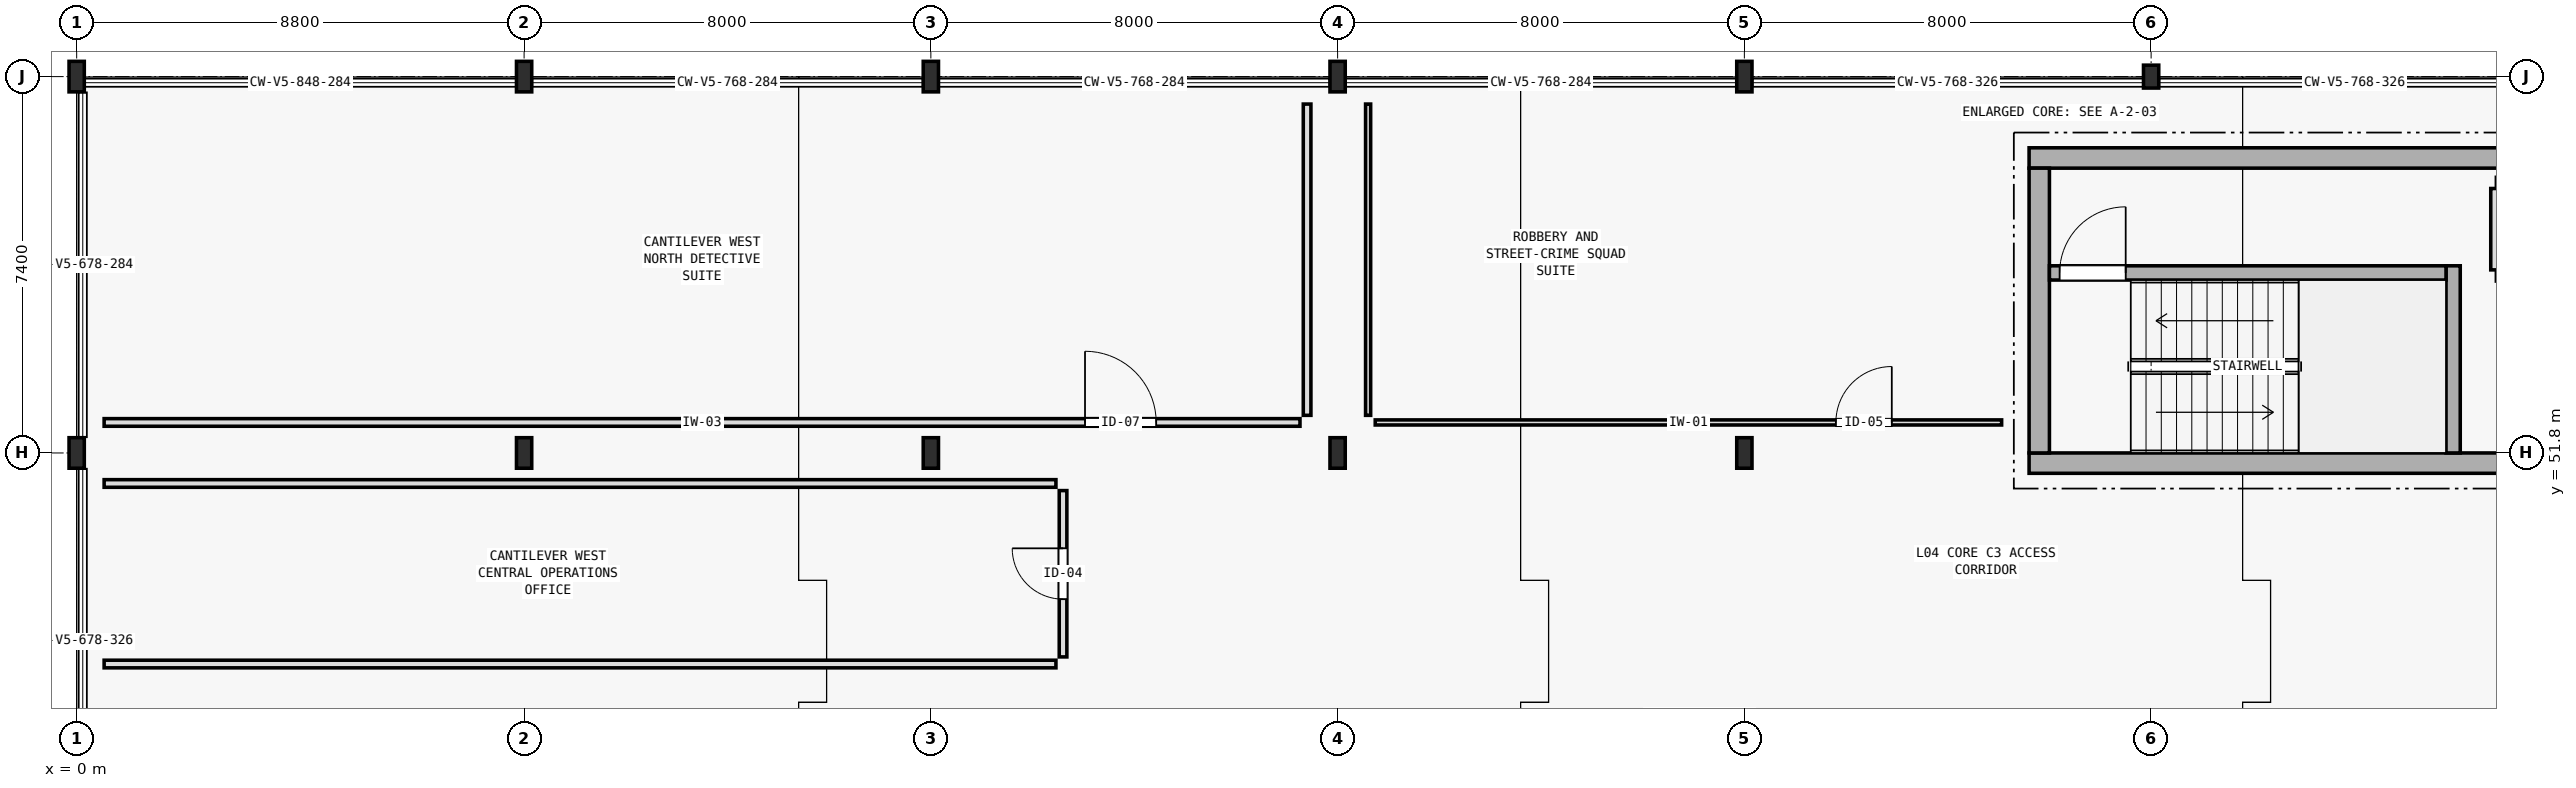
"""IFC4 building model, lengths in metres.
Left out: names, types, materials, properties, quantities, classifications, styles, units other than length and angle.
Written with IfcOpenShell. Run it as: python <this file> out.ifc"""

import sys

from ifc_helpers import new_model, si_unit, direction, frame, frame_2d, origin, origin_2d, place, context, subcontext, project, spatial, rectangle, i_section, extrude, element, fill, save


model = new_model("IFC4")
c1 = context("Model", 3, precision=1e-05, world=origin(), true_north=direction((0.0, 1.0)))
c2 = subcontext(c1, "Body", "Model", "MODEL_VIEW")
j1 = project(units=[si_unit("LENGTHUNIT", "METRE"), si_unit("PLANEANGLEUNIT", "RADIAN")], contexts=[c1])
p1 = place(None, origin())
s1 = spatial("IfcSite", under=j1, at=p1, CompositionType="ELEMENT")
p2 = place(p1, origin())
s2 = spatial("IfcBuilding", under=s1, at=p2, CompositionType="ELEMENT")
p3 = place(p2, frame((0.0, 0.0, 14.1)))
s3 = spatial("IfcBuildingStorey", under=s2, at=p3, CompositionType="ELEMENT", Elevation=14.1)
p4 = place(p3, frame((38.4, 51.6, 0.0), z_axis=(0.0, 0.0, 1.0), x_axis=(1.0, 0.0, 0.0)))
e1 = element("IfcWall", 1, at=p4, inside=s3, PredefinedType="SHEAR", context=c2, shape_type="SweptSolid", body=[
    extrude(rectangle(XDim=15.2, YDim=0.4, at=frame_2d((7.6, 0.0))), origin(), (0.0, 0.0, 1.0), 3.995),
])
p5 = place(p4, frame((10.25, 0.0, 0.0)))
e2 = element("IfcOpeningElement", 2, at=p5, cuts=e1, PredefinedType="OPENING", context=c2, shape_type="SweptSolid", body=[
    extrude(rectangle(XDim=1.3, YDim=2.2, at=frame_2d((0.65, 1.1))), frame((0.0, 0.21, 0.0), z_axis=(0.0, -1.0, 0.0), x_axis=(1.0, 0.0, 0.0)), (0.0, 0.0, 1.0), 0.42),
])
p6 = place(p3, frame((38.4, 57.6, 0.0), z_axis=(0.0, 0.0, 1.0), x_axis=(1.0, 0.0, 0.0)))
e3 = element("IfcWall", 3, at=p6, inside=s3, PredefinedType="SHEAR", context=c2, shape_type="SweptSolid", body=[
    extrude(rectangle(XDim=15.2, YDim=0.4, at=frame_2d((7.6, 0.0))), origin(), (0.0, 0.0, 1.0), 3.995),
])
p7 = place(p3, frame((38.6, 51.8, 0.0), z_axis=(0.0, 0.0, 1.0), x_axis=(0.0, 1.0, 0.0)))
e4 = element("IfcWall", 4, at=p7, inside=s3, PredefinedType="SHEAR", context=c2, shape_type="SweptSolid", body=[
    extrude(rectangle(XDim=5.6, YDim=0.4, at=frame_2d((2.8, 0.0))), origin(), (0.0, 0.0, 1.0), 3.995),
])
p8 = place(p3, frame((46.74, 51.8, 0.0), z_axis=(0.0, 0.0, 1.0), x_axis=(0.0, 1.0, 0.0)))
e5 = element("IfcWall", 5, at=p8, inside=s3, PredefinedType="SHEAR", context=c2, shape_type="SweptSolid", body=[
    extrude(rectangle(XDim=3.68, YDim=0.28, at=frame_2d((1.84, 0.0))), origin(), (0.0, 0.0, 1.0), 3.995),
])
p9 = place(p3, frame((38.8, 55.34, 0.0), z_axis=(0.0, 0.0, 1.0), x_axis=(1.0, 0.0, 0.0)))
e6 = element("IfcWall", 6, at=p9, inside=s3, PredefinedType="SHEAR", context=c2, shape_type="SweptSolid", body=[
    extrude(rectangle(XDim=7.8, YDim=0.28, at=frame_2d((3.9, 0.0))), origin(), (0.0, 0.0, 1.0), 3.995),
])
p10 = place(p9, frame((0.2, 0.0, 0.0)))
e7 = element("IfcOpeningElement", 7, at=p10, cuts=e6, PredefinedType="OPENING", context=c2, shape_type="SweptSolid", body=[
    extrude(rectangle(XDim=1.3, YDim=2.2, at=frame_2d((0.65, 1.1))), frame((0.0, 0.15, 0.0), z_axis=(0.0, -1.0, 0.0), x_axis=(1.0, 0.0, 0.0)), (0.0, 0.0, 1.0), 0.3),
])
for number, where, z_axis, x_axis in (
    (8, (0.0, 51.8, 0.0), (0.0, 0.0, 1.0), (1.0, 0.0, 0.0)),
    (9, (0.0, 59.2, 0.0), (0.0, 0.0, 1.0), (1.0, 0.0, 0.0)),
    (10, (8.8, 51.8, 0.0), (0.0, 0.0, 1.0), (1.0, 0.0, 0.0)),
    (11, (8.8, 59.2, 0.0), (0.0, 0.0, 1.0), (1.0, 0.0, 0.0)),
    (12, (16.8, 51.8, 0.0), (0.0, 0.0, 1.0), (1.0, 0.0, 0.0)),
    (13, (16.8, 59.2, 0.0), (0.0, 0.0, 1.0), (1.0, 0.0, 0.0)),
    (14, (24.8, 51.8, 0.0), (0.0, 0.0, 1.0), (1.0, 0.0, 0.0)),
    (15, (24.8, 59.2, 0.0), (0.0, 0.0, 1.0), (1.0, 0.0, 0.0)),
    (16, (32.8, 51.8, 0.0), (0.0, 0.0, 1.0), (1.0, 0.0, 0.0)),
    (17, (32.8, 59.2, 0.0), (0.0, 0.0, 1.0), (1.0, 0.0, 0.0)),
):
    element("IfcColumn", number, at=place(p3, frame(where, z_axis=z_axis, x_axis=x_axis)), inside=s3, PredefinedType="COLUMN", context=c2, shape_type="SweptSolid", body=[
        extrude(i_section(OverallWidth=0.3, OverallDepth=0.6, WebThickness=0.015, FlangeThickness=0.03, FilletRadius=0.027, at=origin_2d()), origin(), (0.0, 0.0, 1.0), 4.0),
    ])
p11 = place(p3, frame((40.8, 59.2, 0.0), z_axis=(0.0, 0.0, 1.0), x_axis=(1.0, 0.0, 0.0)))
e18 = element("IfcColumn", 18, at=p11, inside=s3, PredefinedType="COLUMN", context=c2, shape_type="SweptSolid", body=[
    extrude(i_section(OverallWidth=0.3, OverallDepth=0.45, WebThickness=0.014, FlangeThickness=0.026, FilletRadius=0.027, at=origin_2d()), origin(), (0.0, 0.0, 1.0), 4.0),
])
p12 = place(p3, frame((47.59, 55.29, 0.0), z_axis=(0.0, 0.0, 1.0), x_axis=(1.0, 0.0, 0.0)))
e19 = element("IfcWall", 19, at=p12, inside=s3, PredefinedType="PLUMBINGWALL", context=c2, shape_type="SweptSolid", body=[
    extrude(rectangle(XDim=1.62, YDim=0.22, at=frame_2d((0.81, 0.0))), origin(), (0.0, 0.0, 1.0), 3.72),
])
p13 = place(p12, frame((0.31, 0.0, 0.0)))
e20 = element("IfcOpeningElement", 20, at=p13, cuts=e19, PredefinedType="OPENING", context=c2, shape_type="SweptSolid", body=[
    extrude(rectangle(XDim=1.0, YDim=2.2, at=frame_2d((0.5, 1.1))), frame((0.0, 0.12, 0.0), z_axis=(0.0, -1.0, 0.0), x_axis=(1.0, 0.0, 0.0)), (0.0, 0.0, 1.0), 0.24),
])
p14 = place(p3, frame((47.59, 57.11, 0.0), z_axis=(0.0, 0.0, 1.0), x_axis=(1.0, 0.0, 0.0)))
e21 = element("IfcWall", 21, at=p14, inside=s3, PredefinedType="PLUMBINGWALL", context=c2, shape_type="SweptSolid", body=[
    extrude(rectangle(XDim=1.62, YDim=0.22, at=frame_2d((0.81, 0.0))), origin(), (0.0, 0.0, 1.0), 3.72),
])
p15 = place(p3, frame((47.59, 55.4, 0.0), z_axis=(0.0, 0.0, 1.0), x_axis=(0.0, 1.0, 0.0)))
e22 = element("IfcWall", 22, at=p15, inside=s3, PredefinedType="PLUMBINGWALL", context=c2, shape_type="SweptSolid", body=[
    extrude(rectangle(XDim=1.6, YDim=0.22, at=frame_2d((0.8, 0.0))), origin(), (0.0, 0.0, 1.0), 3.72),
])
for number, where, z_axis, x_axis in (
    (23, (0.54, 47.65, 0.0), (0.0, 0.0, 1.0), (1.0, 0.0, 0.0)),
    (24, (0.54, 51.2, 0.0), (0.0, 0.0, 1.0), (1.0, 0.0, 0.0)),
):
    element("IfcWall", number, at=place(p3, frame(where, z_axis=z_axis, x_axis=x_axis)), inside=s3, PredefinedType="PARTITIONING", context=c2, shape_type="SweptSolid", body=[
        extrude(rectangle(XDim=18.72, YDim=0.15, at=frame_2d((9.36, 0.0))), origin(), (0.0, 0.0, 1.0), 3.245),
    ])
p16 = place(p3, frame((19.4, 47.79, 0.0), z_axis=(0.0, 0.0, 1.0), x_axis=(0.0, 1.0, 0.0)))
e25 = element("IfcWall", 25, at=p16, inside=s3, PredefinedType="PARTITIONING", context=c2, shape_type="SweptSolid", body=[
    extrude(rectangle(XDim=3.27, YDim=0.15, at=frame_2d((1.635, 0.0))), origin(), (0.0, 0.0, 1.0), 3.435),
])
p17 = place(p16, frame((1.135, 0.0, 0.0)))
e26 = element("IfcOpeningElement", 26, at=p17, cuts=e25, PredefinedType="OPENING", context=c2, shape_type="SweptSolid", body=[
    extrude(rectangle(XDim=1.0, YDim=2.2, at=frame_2d((0.5, 1.1))), frame((0.0, 0.085, 0.0), z_axis=(0.0, -1.0, 0.0), x_axis=(1.0, 0.0, 0.0)), (0.0, 0.0, 1.0), 0.17),
])
p18 = place(p3, frame((0.54, 52.4, 0.0), z_axis=(0.0, 0.0, 1.0), x_axis=(1.0, 0.0, 0.0)))
e27 = element("IfcWall", 27, at=p18, inside=s3, PredefinedType="PARTITIONING", context=c2, shape_type="SweptSolid", body=[
    extrude(rectangle(XDim=23.52, YDim=0.15, at=frame_2d((11.76, 0.0))), origin(), (0.0, 0.0, 1.0), 3.245),
])
p19 = place(p18, frame((19.292, 0.0, 0.0)))
e28 = element("IfcOpeningElement", 28, at=p19, cuts=e27, PredefinedType="OPENING", context=c2, shape_type="SweptSolid", body=[
    extrude(rectangle(XDim=1.4, YDim=2.2, at=frame_2d((0.7, 1.1))), frame((0.0, 0.085, 0.0), z_axis=(0.0, -1.0, 0.0), x_axis=(1.0, 0.0, 0.0)), (0.0, 0.0, 1.0), 0.17),
])
p20 = place(p3, frame((24.2, 52.54, 0.0), z_axis=(0.0, 0.0, 1.0), x_axis=(0.0, 1.0, 0.0)))
e29 = element("IfcWall", 29, at=p20, inside=s3, PredefinedType="PARTITIONING", context=c2, shape_type="SweptSolid", body=[
    extrude(rectangle(XDim=6.12, YDim=0.15, at=frame_2d((3.06, 0.0))), origin(), (0.0, 0.0, 1.0), 3.67),
])
p21 = place(p3, frame((25.54, 52.4, 0.0), z_axis=(0.0, 0.0, 1.0), x_axis=(1.0, 0.0, 0.0)))
e30 = element("IfcWall", 30, at=p21, inside=s3, PredefinedType="PARTITIONING", context=c2, shape_type="SweptSolid", body=[
    extrude(rectangle(XDim=12.32, YDim=0.1, at=frame_2d((6.16, 0.0))), origin(), (0.0, 0.0, 1.0), 3.245),
])
p22 = place(p21, frame((9.06, 0.0, 0.0)))
e31 = element("IfcOpeningElement", 31, at=p22, cuts=e30, PredefinedType="OPENING", context=c2, shape_type="SweptSolid", body=[
    extrude(rectangle(XDim=1.1, YDim=2.2, at=frame_2d((0.55, 1.1))), frame((0.0, 0.06, 0.0), z_axis=(0.0, -1.0, 0.0), x_axis=(1.0, 0.0, 0.0)), (0.0, 0.0, 1.0), 0.12),
])
p23 = place(p3, frame((25.4, 52.54, 0.0), z_axis=(0.0, 0.0, 1.0), x_axis=(0.0, 1.0, 0.0)))
e32 = element("IfcWall", 32, at=p23, inside=s3, PredefinedType="PARTITIONING", context=c2, shape_type="SweptSolid", body=[
    extrude(rectangle(XDim=6.12, YDim=0.1, at=frame_2d((3.06, 0.0))), origin(), (0.0, 0.0, 1.0), 3.67),
])
p24 = place(p10, origin())
e33 = element("IfcDoor", 33, at=p24, inside=s3, OperationType="SINGLE_SWING_RIGHT", PredefinedType="DOOR", context=c2, shape_type="SweptSolid", body=[
    extrude(rectangle(XDim=1.3, YDim=2.2, at=frame_2d((0.65, 1.1))), frame((0.0, 0.025, 0.0), z_axis=(0.0, -1.0, 0.0), x_axis=(1.0, 0.0, 0.0)), (0.0, 0.0, 1.0), 0.05),
])
fill(e7, e33)
p25 = place(p17, origin())
e34 = element("IfcDoor", 34, at=p25, inside=s3, OperationType="SINGLE_SWING_RIGHT", PredefinedType="DOOR", context=c2, shape_type="SweptSolid", body=[
    extrude(rectangle(XDim=1.0, YDim=2.2, at=frame_2d((0.5, 1.1))), frame((0.0, 0.025, 0.0), z_axis=(0.0, -1.0, 0.0), x_axis=(1.0, 0.0, 0.0)), (0.0, 0.0, 1.0), 0.05),
])
fill(e26, e34)
p26 = place(p19, origin())
e35 = element("IfcDoor", 35, at=p26, inside=s3, OperationType="SINGLE_SWING_LEFT", PredefinedType="DOOR", context=c2, shape_type="SweptSolid", body=[
    extrude(rectangle(XDim=1.4, YDim=2.2, at=frame_2d((0.7, 1.1))), frame((0.0, 0.025, 0.0), z_axis=(0.0, -1.0, 0.0), x_axis=(1.0, 0.0, 0.0)), (0.0, 0.0, 1.0), 0.05),
])
fill(e28, e35)
p27 = place(p22, origin())
e36 = element("IfcDoor", 36, at=p27, inside=s3, OperationType="SINGLE_SWING_RIGHT", PredefinedType="DOOR", context=c2, shape_type="SweptSolid", body=[
    extrude(rectangle(XDim=1.1, YDim=2.2, at=frame_2d((0.55, 1.1))), frame((0.0, 0.025, 0.0), z_axis=(0.0, -1.0, 0.0), x_axis=(1.0, 0.0, 0.0)), (0.0, 0.0, 1.0), 0.05),
])
fill(e31, e36)
save(model, sys.argv[1])
